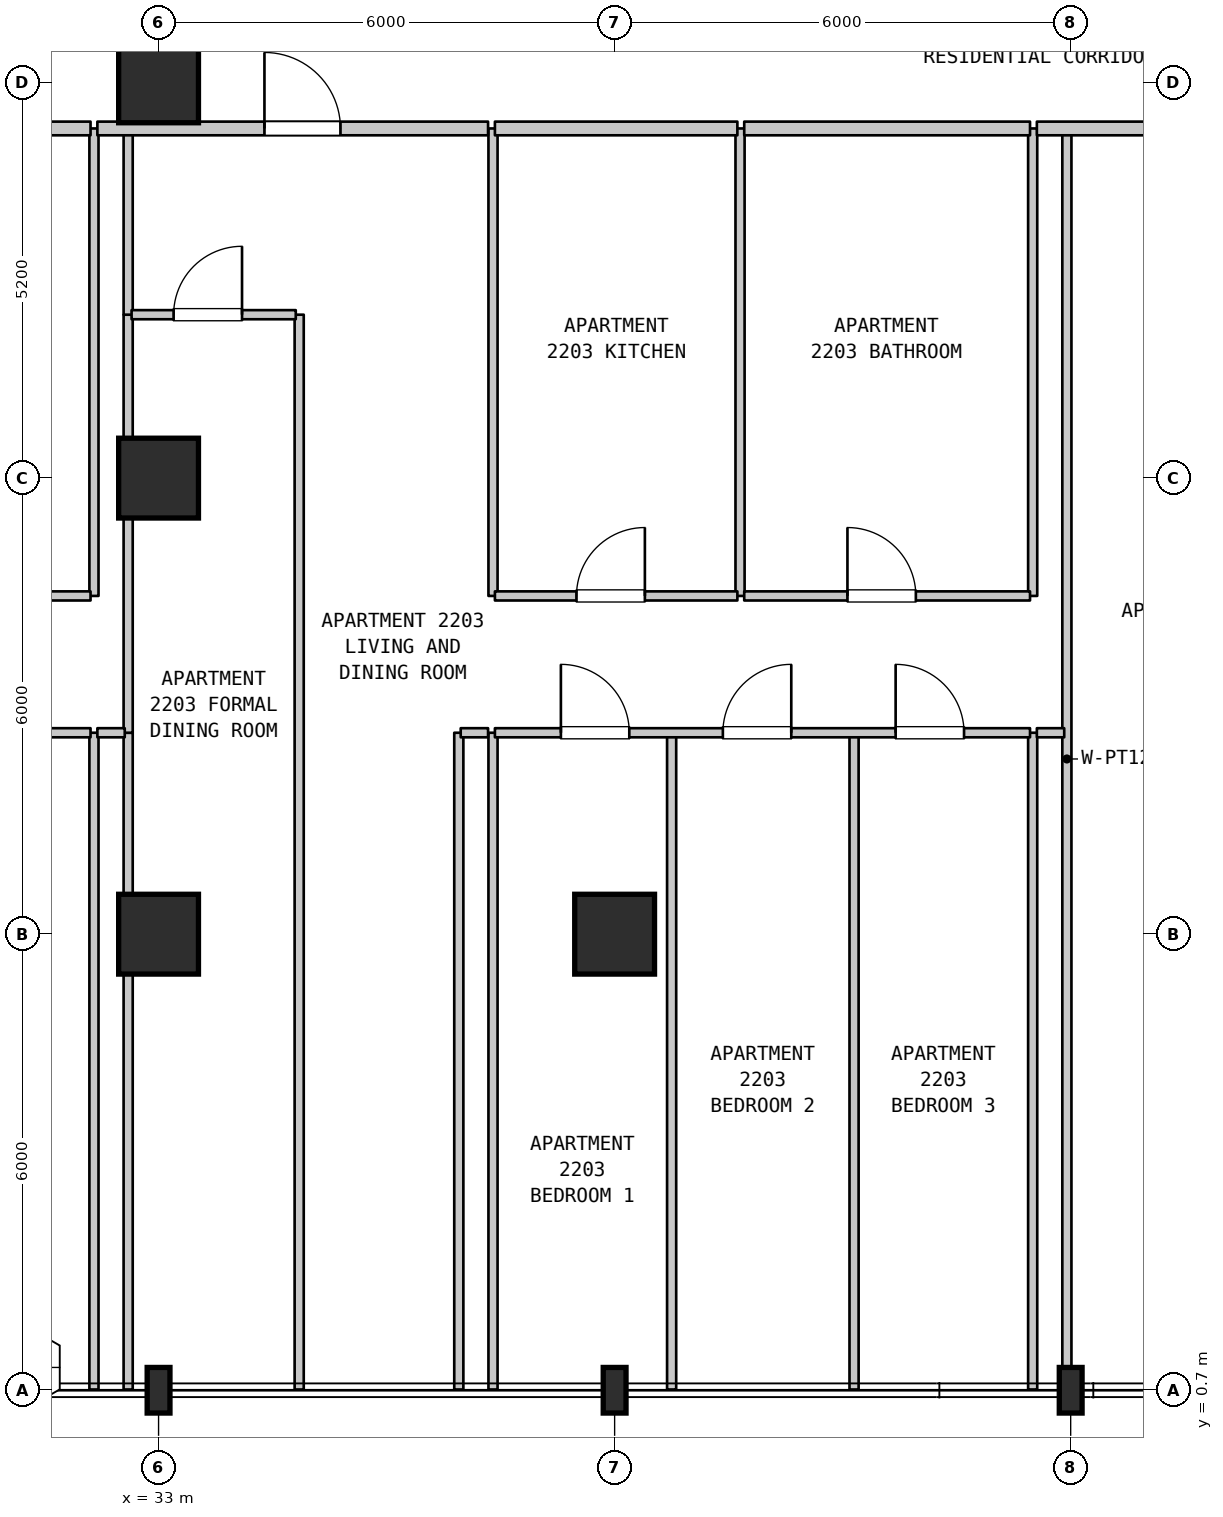
"""IFC4 building model, lengths in metres.
Left out: names, types, materials, properties, quantities, classifications, styles, units other than length and angle.
Written with IfcOpenShell. Run it as: python <this file> out.ifc"""

import sys

from ifc_helpers import new_model, si_unit, direction, frame, frame_2d, origin, origin_2d, place, context, subcontext, project, spatial, rectangle, i_section, extrude, element, fill, save


model = new_model("IFC4")
c1 = context("Model", 3, precision=1e-05, world=origin(), true_north=direction((0.0, 1.0)))
c2 = subcontext(c1, "Body", "Model", "MODEL_VIEW")
j1 = project(units=[si_unit("LENGTHUNIT", "METRE"), si_unit("PLANEANGLEUNIT", "RADIAN")], contexts=[c1])
p1 = place(None, origin())
s1 = spatial("IfcSite", under=j1, at=p1, CompositionType="ELEMENT")
p2 = place(p1, origin())
s2 = spatial("IfcBuilding", under=s1, at=p2, CompositionType="ELEMENT")
p3 = place(p2, frame((0.0, 0.0, 94.6)))
s3 = spatial("IfcBuildingStorey", under=s2, at=p3, CompositionType="ELEMENT", Elevation=94.6)
p4 = place(p3, frame((33.0, 0.7, 0.0), z_axis=(0.0, 0.0, 1.0), x_axis=(1.0, 0.0, 0.0)))
e1 = element("IfcColumn", 1, at=p4, inside=s3, PredefinedType="COLUMN", context=c2, shape_type="SweptSolid", body=[
    extrude(i_section(OverallWidth=0.3, OverallDepth=0.6, WebThickness=0.015, FlangeThickness=0.03, FilletRadius=0.027, at=origin_2d()), origin(), (0.0, 0.0, 1.0), 3.7),
])
for number, where, z_axis, x_axis in (
    (2, (33.0, 6.7, 0.0), (0.0, 0.0, 1.0), (1.0, 0.0, 0.0)),
    (3, (33.0, 12.7, 0.0), (0.0, 0.0, 1.0), (1.0, 0.0, 0.0)),
    (4, (33.0, 17.9, 0.0), (0.0, 0.0, 1.0), (1.0, 0.0, 0.0)),
):
    element("IfcColumn", number, at=place(p3, frame(where, z_axis=z_axis, x_axis=x_axis)), inside=s3, PredefinedType="COLUMN", context=c2, shape_type="SweptSolid", body=[
        extrude(rectangle(XDim=1.05, YDim=1.05, at=origin_2d()), origin(), (0.0, 0.0, 1.0), 3.7),
    ])
p5 = place(p3, frame((39.0, 0.7, 0.0), z_axis=(0.0, 0.0, 1.0), x_axis=(1.0, 0.0, 0.0)))
e5 = element("IfcColumn", 5, at=p5, inside=s3, PredefinedType="COLUMN", context=c2, shape_type="SweptSolid", body=[
    extrude(i_section(OverallWidth=0.3, OverallDepth=0.6, WebThickness=0.015, FlangeThickness=0.03, FilletRadius=0.027, at=origin_2d()), origin(), (0.0, 0.0, 1.0), 3.7),
])
p6 = place(p3, frame((39.0, 6.7, 0.0), z_axis=(0.0, 0.0, 1.0), x_axis=(1.0, 0.0, 0.0)))
e6 = element("IfcColumn", 6, at=p6, inside=s3, PredefinedType="COLUMN", context=c2, shape_type="SweptSolid", body=[
    extrude(rectangle(XDim=1.05, YDim=1.05, at=origin_2d()), origin(), (0.0, 0.0, 1.0), 3.7),
])
p7 = place(p3, frame((45.0, 0.7, 0.0), z_axis=(0.0, 0.0, 1.0), x_axis=(1.0, 0.0, 0.0)))
e7 = element("IfcColumn", 7, at=p7, inside=s3, PredefinedType="COLUMN", context=c2, shape_type="SweptSolid", body=[
    extrude(i_section(OverallWidth=0.3, OverallDepth=0.6, WebThickness=0.015, FlangeThickness=0.03, FilletRadius=0.027, at=origin_2d()), origin(), (0.0, 0.0, 1.0), 3.7),
])
p8 = place(p3, frame((32.15, 0.71, 0.0), z_axis=(0.0, 0.0, 1.0), x_axis=(0.0, 1.0, 0.0)))
e8 = element("IfcWall", 8, at=p8, inside=s3, PredefinedType="PARTITIONING", context=c2, shape_type="SweptSolid", body=[
    extrude(rectangle(XDim=8.64, YDim=0.12, at=frame_2d((4.32, 0.0))), origin(), (0.0, 0.0, 1.0), 3.385),
])
p9 = place(p3, frame((32.15, 11.15, 0.0), z_axis=(0.0, 0.0, 1.0), x_axis=(0.0, 1.0, 0.0)))
e9 = element("IfcWall", 9, at=p9, inside=s3, PredefinedType="PARTITIONING", context=c2, shape_type="SweptSolid", body=[
    extrude(rectangle(XDim=6.15, YDim=0.12, at=frame_2d((3.075, 0.0))), origin(), (0.0, 0.0, 1.0), 3.385),
])
p10 = place(p3, frame((32.6, 0.71, 0.0), z_axis=(0.0, 0.0, 1.0), x_axis=(0.0, 1.0, 0.0)))
e10 = element("IfcWall", 10, at=p10, inside=s3, PredefinedType="PARTITIONING", context=c2, shape_type="SweptSolid", body=[
    extrude(rectangle(XDim=8.64, YDim=0.12, at=frame_2d((4.32, 0.0))), origin(), (0.0, 0.0, 1.0), 3.385),
])
p11 = place(p3, frame((32.6, 9.35, 0.0), z_axis=(0.0, 0.0, 1.0), x_axis=(0.0, 1.0, 0.0)))
e11 = element("IfcWall", 11, at=p11, inside=s3, PredefinedType="PARTITIONING", context=c2, shape_type="SweptSolid", body=[
    extrude(rectangle(XDim=5.5, YDim=0.12, at=frame_2d((2.75, 0.0))), origin(), (0.0, 0.0, 1.0), 3.385),
])
p12 = place(p3, frame((32.6, 14.85, 0.0), z_axis=(0.0, 0.0, 1.0), x_axis=(0.0, 1.0, 0.0)))
e12 = element("IfcWall", 12, at=p12, inside=s3, PredefinedType="PARTITIONING", context=c2, shape_type="SweptSolid", body=[
    extrude(rectangle(XDim=2.45, YDim=0.12, at=frame_2d((1.225, 0.0))), origin(), (0.0, 0.0, 1.0), 3.385),
])
p13 = place(p3, frame((34.85, 0.71, 0.0), z_axis=(0.0, 0.0, 1.0), x_axis=(0.0, 1.0, 0.0)))
e13 = element("IfcWall", 13, at=p13, inside=s3, PredefinedType="PARTITIONING", context=c2, shape_type="SweptSolid", body=[
    extrude(rectangle(XDim=14.14, YDim=0.12, at=frame_2d((7.07, 0.0))), origin(), (0.0, 0.0, 1.0), 3.385),
])
for number, where, z_axis, x_axis in (
    (14, (36.95, 0.71, 0.0), (0.0, 0.0, 1.0), (0.0, 1.0, 0.0)),
    (15, (37.4, 0.71, 0.0), (0.0, 0.0, 1.0), (0.0, 1.0, 0.0)),
):
    element("IfcWall", number, at=place(p3, frame(where, z_axis=z_axis, x_axis=x_axis)), inside=s3, PredefinedType="PARTITIONING", context=c2, shape_type="SweptSolid", body=[
        extrude(rectangle(XDim=8.64, YDim=0.12, at=frame_2d((4.32, 0.0))), origin(), (0.0, 0.0, 1.0), 3.385),
    ])
p14 = place(p3, frame((37.4, 11.15, 0.0), z_axis=(0.0, 0.0, 1.0), x_axis=(0.0, 1.0, 0.0)))
e16 = element("IfcWall", 16, at=p14, inside=s3, PredefinedType="PARTITIONING", context=c2, shape_type="SweptSolid", body=[
    extrude(rectangle(XDim=6.15, YDim=0.12, at=frame_2d((3.075, 0.0))), origin(), (0.0, 0.0, 1.0), 3.385),
])
p15 = place(p3, frame((39.75, 0.71, 0.0), z_axis=(0.0, 0.0, 1.0), x_axis=(0.0, 1.0, 0.0)))
e17 = element("IfcWall", 17, at=p15, inside=s3, PredefinedType="PARTITIONING", context=c2, shape_type="SweptSolid", body=[
    extrude(rectangle(XDim=8.64, YDim=0.12, at=frame_2d((4.32, 0.0))), origin(), (0.0, 0.0, 1.0), 3.385),
])
p16 = place(p3, frame((40.65, 11.15, 0.0), z_axis=(0.0, 0.0, 1.0), x_axis=(0.0, 1.0, 0.0)))
e18 = element("IfcWall", 18, at=p16, inside=s3, PredefinedType="PARTITIONING", context=c2, shape_type="SweptSolid", body=[
    extrude(rectangle(XDim=6.15, YDim=0.12, at=frame_2d((3.075, 0.0))), origin(), (0.0, 0.0, 1.0), 3.385),
])
for number, where, z_axis, x_axis in (
    (19, (42.15, 0.71, 0.0), (0.0, 0.0, 1.0), (0.0, 1.0, 0.0)),
    (20, (44.5, 0.71, 0.0), (0.0, 0.0, 1.0), (0.0, 1.0, 0.0)),
):
    element("IfcWall", number, at=place(p3, frame(where, z_axis=z_axis, x_axis=x_axis)), inside=s3, PredefinedType="PARTITIONING", context=c2, shape_type="SweptSolid", body=[
        extrude(rectangle(XDim=8.64, YDim=0.12, at=frame_2d((4.32, 0.0))), origin(), (0.0, 0.0, 1.0), 3.385),
    ])
p17 = place(p3, frame((44.5, 11.15, 0.0), z_axis=(0.0, 0.0, 1.0), x_axis=(0.0, 1.0, 0.0)))
e21 = element("IfcWall", 21, at=p17, inside=s3, PredefinedType="PARTITIONING", context=c2, shape_type="SweptSolid", body=[
    extrude(rectangle(XDim=6.15, YDim=0.12, at=frame_2d((3.075, 0.0))), origin(), (0.0, 0.0, 1.0), 3.385),
])
p18 = place(p3, frame((44.95, 0.71, 0.0), z_axis=(0.0, 0.0, 1.0), x_axis=(0.0, 1.0, 0.0)))
e22 = element("IfcWall", 22, at=p18, inside=s3, PredefinedType="PARTITIONING", context=c2, shape_type="SweptSolid", body=[
    extrude(rectangle(XDim=16.59, YDim=0.12, at=frame_2d((8.295, 0.0))), origin(), (0.0, 0.0, 1.0), 3.385),
])
p19 = place(p3, frame((25.375, 9.35, 0.0), z_axis=(0.0, 0.0, 1.0), x_axis=(1.0, 0.0, 0.0)))
e23 = element("IfcWall", 23, at=p19, inside=s3, PredefinedType="PARTITIONING", context=c2, shape_type="SweptSolid", body=[
    extrude(rectangle(XDim=6.73, YDim=0.12, at=frame_2d((3.365, 0.0))), origin(), (0.0, 0.0, 1.0), 3.385),
])
p20 = place(p19, frame((1.31, 0.0, 0.0)))
e24 = element("IfcOpeningElement", 24, at=p20, cuts=e23, PredefinedType="OPENING", context=c2, shape_type="SweptSolid", body=[
    extrude(rectangle(XDim=0.9, YDim=2.15, at=frame_2d((0.45, 1.075))), frame((0.0, 0.07, 0.0), z_axis=(0.0, -1.0, 0.0), x_axis=(1.0, 0.0, 0.0)), (0.0, 0.0, 1.0), 0.14),
])
p21 = place(p19, frame((4.37, 0.0, 0.0)))
e25 = element("IfcOpeningElement", 25, at=p21, cuts=e23, PredefinedType="OPENING", context=c2, shape_type="SweptSolid", body=[
    extrude(rectangle(XDim=0.9, YDim=2.15, at=frame_2d((0.45, 1.075))), frame((0.0, 0.07, 0.0), z_axis=(0.0, -1.0, 0.0), x_axis=(1.0, 0.0, 0.0)), (0.0, 0.0, 1.0), 0.14),
])
for number, where, z_axis, x_axis in (
    (26, (32.195, 9.35, 0.0), (0.0, 0.0, 1.0), (1.0, 0.0, 0.0)),
    (27, (36.975, 9.35, 0.0), (0.0, 0.0, 1.0), (1.0, 0.0, 0.0)),
):
    element("IfcWall", number, at=place(p3, frame(where, z_axis=z_axis, x_axis=x_axis)), inside=s3, PredefinedType="PARTITIONING", context=c2, shape_type="SweptSolid", body=[
        extrude(rectangle(XDim=0.36, YDim=0.12, at=frame_2d((0.18, 0.0))), origin(), (0.0, 0.0, 1.0), 3.385),
    ])
p22 = place(p3, frame((37.425, 9.35, 0.0), z_axis=(0.0, 0.0, 1.0), x_axis=(1.0, 0.0, 0.0)))
e28 = element("IfcWall", 28, at=p22, inside=s3, PredefinedType="PARTITIONING", context=c2, shape_type="SweptSolid", body=[
    extrude(rectangle(XDim=7.04, YDim=0.12, at=frame_2d((3.52, 0.0))), origin(), (0.0, 0.0, 1.0), 3.385),
])
p23 = place(p22, frame((0.868, 0.0, 0.0)))
e29 = element("IfcOpeningElement", 29, at=p23, cuts=e28, PredefinedType="OPENING", context=c2, shape_type="SweptSolid", body=[
    extrude(rectangle(XDim=0.9, YDim=2.15, at=frame_2d((0.45, 1.075))), frame((0.0, 0.07, 0.0), z_axis=(0.0, -1.0, 0.0), x_axis=(1.0, 0.0, 0.0)), (0.0, 0.0, 1.0), 0.14),
])
p24 = place(p22, frame((2.999, 0.0, 0.0)))
e30 = element("IfcOpeningElement", 30, at=p24, cuts=e28, PredefinedType="OPENING", context=c2, shape_type="SweptSolid", body=[
    extrude(rectangle(XDim=0.9, YDim=2.15, at=frame_2d((0.45, 1.075))), frame((0.0, 0.07, 0.0), z_axis=(0.0, -1.0, 0.0), x_axis=(1.0, 0.0, 0.0)), (0.0, 0.0, 1.0), 0.14),
])
p25 = place(p22, frame((5.272, 0.0, 0.0)))
e31 = element("IfcOpeningElement", 31, at=p25, cuts=e28, PredefinedType="OPENING", context=c2, shape_type="SweptSolid", body=[
    extrude(rectangle(XDim=0.9, YDim=2.15, at=frame_2d((0.45, 1.075))), frame((0.0, 0.07, 0.0), z_axis=(0.0, -1.0, 0.0), x_axis=(1.0, 0.0, 0.0)), (0.0, 0.0, 1.0), 0.14),
])
p26 = place(p3, frame((44.555, 9.35, 0.0), z_axis=(0.0, 0.0, 1.0), x_axis=(1.0, 0.0, 0.0)))
e32 = element("IfcWall", 32, at=p26, inside=s3, PredefinedType="PARTITIONING", context=c2, shape_type="SweptSolid", body=[
    extrude(rectangle(XDim=0.36, YDim=0.12, at=frame_2d((0.18, 0.0))), origin(), (0.0, 0.0, 1.0), 3.385),
])
p27 = place(p3, frame((28.512, 11.15, 0.0), z_axis=(0.0, 0.0, 1.0), x_axis=(1.0, 0.0, 0.0)))
e33 = element("IfcWall", 33, at=p27, inside=s3, PredefinedType="PARTITIONING", context=c2, shape_type="SweptSolid", body=[
    extrude(rectangle(XDim=3.593, YDim=0.12, at=frame_2d((1.796, 0.0))), origin(), (0.0, 0.0, 1.0), 3.385),
])
p28 = place(p27, frame((1.346, 0.0, 0.0)))
e34 = element("IfcOpeningElement", 34, at=p28, cuts=e33, PredefinedType="OPENING", context=c2, shape_type="SweptSolid", body=[
    extrude(rectangle(XDim=0.9, YDim=2.1, at=frame_2d((0.45, 1.05))), frame((0.0, 0.07, 0.0), z_axis=(0.0, -1.0, 0.0), x_axis=(1.0, 0.0, 0.0)), (0.0, 0.0, 1.0), 0.14),
])
p29 = place(p3, frame((37.425, 11.15, 0.0), z_axis=(0.0, 0.0, 1.0), x_axis=(1.0, 0.0, 0.0)))
e35 = element("IfcWall", 35, at=p29, inside=s3, PredefinedType="PARTITIONING", context=c2, shape_type="SweptSolid", body=[
    extrude(rectangle(XDim=3.19, YDim=0.12, at=frame_2d((1.595, 0.0))), origin(), (0.0, 0.0, 1.0), 3.385),
])
p30 = place(p29, frame((1.073, 0.0, 0.0)))
e36 = element("IfcOpeningElement", 36, at=p30, cuts=e35, PredefinedType="OPENING", context=c2, shape_type="SweptSolid", body=[
    extrude(rectangle(XDim=0.9, YDim=2.15, at=frame_2d((0.45, 1.075))), frame((0.0, 0.07, 0.0), z_axis=(0.0, -1.0, 0.0), x_axis=(1.0, 0.0, 0.0)), (0.0, 0.0, 1.0), 0.14),
])
p31 = place(p3, frame((40.705, 11.15, 0.0), z_axis=(0.0, 0.0, 1.0), x_axis=(1.0, 0.0, 0.0)))
e37 = element("IfcWall", 37, at=p31, inside=s3, PredefinedType="PARTITIONING", context=c2, shape_type="SweptSolid", body=[
    extrude(rectangle(XDim=3.76, YDim=0.12, at=frame_2d((1.88, 0.0))), origin(), (0.0, 0.0, 1.0), 3.385),
])
p32 = place(p31, frame((1.358, 0.0, 0.0)))
e38 = element("IfcOpeningElement", 38, at=p32, cuts=e37, PredefinedType="OPENING", context=c2, shape_type="SweptSolid", body=[
    extrude(rectangle(XDim=0.9, YDim=2.1, at=frame_2d((0.45, 1.05))), frame((0.0, 0.07, 0.0), z_axis=(0.0, -1.0, 0.0), x_axis=(1.0, 0.0, 0.0)), (0.0, 0.0, 1.0), 0.14),
])
p33 = place(p3, frame((32.645, 14.85, 0.0), z_axis=(0.0, 0.0, 1.0), x_axis=(1.0, 0.0, 0.0)))
e39 = element("IfcWall", 39, at=p33, inside=s3, PredefinedType="PARTITIONING", context=c2, shape_type="SweptSolid", body=[
    extrude(rectangle(XDim=2.16, YDim=0.12, at=frame_2d((1.08, 0.0))), origin(), (0.0, 0.0, 1.0), 3.385),
])
p34 = place(p33, frame((0.553, 0.0, 0.0)))
e40 = element("IfcOpeningElement", 40, at=p34, cuts=e39, PredefinedType="OPENING", context=c2, shape_type="SweptSolid", body=[
    extrude(rectangle(XDim=0.9, YDim=2.15, at=frame_2d((0.45, 1.075))), frame((0.0, 0.07, 0.0), z_axis=(0.0, -1.0, 0.0), x_axis=(1.0, 0.0, 0.0)), (0.0, 0.0, 1.0), 0.14),
])
p35 = place(p3, frame((28.512, 17.3, 0.0), z_axis=(0.0, 0.0, 1.0), x_axis=(1.0, 0.0, 0.0)))
e41 = element("IfcWall", 41, at=p35, inside=s3, PredefinedType="STANDARD", context=c2, shape_type="SweptSolid", body=[
    extrude(rectangle(XDim=3.593, YDim=0.18, at=frame_2d((1.796, 0.0))), origin(), (0.0, 0.0, 1.0), 3.385),
])
p36 = place(p3, frame((32.195, 17.3, 0.0), z_axis=(0.0, 0.0, 1.0), x_axis=(1.0, 0.0, 0.0)))
e42 = element("IfcWall", 42, at=p36, inside=s3, PredefinedType="STANDARD", context=c2, shape_type="SweptSolid", body=[
    extrude(rectangle(XDim=5.14, YDim=0.18, at=frame_2d((2.57, 0.0))), origin(), (0.0, 0.0, 1.0), 3.385),
])
p37 = place(p36, frame((2.198, 0.0, 0.0)))
e43 = element("IfcOpeningElement", 43, at=p37, cuts=e42, PredefinedType="OPENING", context=c2, shape_type="SweptSolid", body=[
    extrude(rectangle(XDim=1.0, YDim=2.15, at=frame_2d((0.5, 1.075))), frame((0.0, 0.1, 0.0), z_axis=(0.0, -1.0, 0.0), x_axis=(1.0, 0.0, 0.0)), (0.0, 0.0, 1.0), 0.2),
])
p38 = place(p3, frame((37.425, 17.3, 0.0), z_axis=(0.0, 0.0, 1.0), x_axis=(1.0, 0.0, 0.0)))
e44 = element("IfcWall", 44, at=p38, inside=s3, PredefinedType="STANDARD", context=c2, shape_type="SweptSolid", body=[
    extrude(rectangle(XDim=3.19, YDim=0.18, at=frame_2d((1.595, 0.0))), origin(), (0.0, 0.0, 1.0), 3.385),
])
p39 = place(p3, frame((40.705, 17.3, 0.0), z_axis=(0.0, 0.0, 1.0), x_axis=(1.0, 0.0, 0.0)))
e45 = element("IfcWall", 45, at=p39, inside=s3, PredefinedType="STANDARD", context=c2, shape_type="SweptSolid", body=[
    extrude(rectangle(XDim=3.76, YDim=0.18, at=frame_2d((1.88, 0.0))), origin(), (0.0, 0.0, 1.0), 3.385),
])
p40 = place(p3, frame((44.555, 17.3, 0.0), z_axis=(0.0, 0.0, 1.0), x_axis=(1.0, 0.0, 0.0)))
e46 = element("IfcWall", 46, at=p40, inside=s3, PredefinedType="STANDARD", context=c2, shape_type="SweptSolid", body=[
    extrude(rectangle(XDim=4.97, YDim=0.18, at=frame_2d((2.485, 0.0))), origin(), (0.0, 0.0, 1.0), 3.385),
])
p41 = place(p40, frame((2.185, 0.0, 0.0)))
e47 = element("IfcOpeningElement", 47, at=p41, cuts=e46, PredefinedType="OPENING", context=c2, shape_type="SweptSolid", body=[
    extrude(rectangle(XDim=1.0, YDim=2.15, at=frame_2d((0.5, 1.075))), frame((0.0, 0.1, 0.0), z_axis=(0.0, -1.0, 0.0), x_axis=(1.0, 0.0, 0.0)), (0.0, 0.0, 1.0), 0.2),
])
p42 = place(p23, origin())
e48 = element("IfcDoor", 48, at=p42, inside=s3, OperationType="SINGLE_SWING_LEFT", PredefinedType="DOOR", context=c2, shape_type="SweptSolid", body=[
    extrude(rectangle(XDim=0.9, YDim=2.15, at=frame_2d((0.45, 1.075))), frame((0.0, 0.025, 0.0), z_axis=(0.0, -1.0, 0.0), x_axis=(1.0, 0.0, 0.0)), (0.0, 0.0, 1.0), 0.05),
])
fill(e29, e48)
p43 = place(p24, origin())
e49 = element("IfcDoor", 49, at=p43, inside=s3, OperationType="SINGLE_SWING_RIGHT", PredefinedType="DOOR", context=c2, shape_type="SweptSolid", body=[
    extrude(rectangle(XDim=0.9, YDim=2.15, at=frame_2d((0.45, 1.075))), frame((0.0, 0.025, 0.0), z_axis=(0.0, -1.0, 0.0), x_axis=(1.0, 0.0, 0.0)), (0.0, 0.0, 1.0), 0.05),
])
fill(e30, e49)
p44 = place(p25, origin())
e50 = element("IfcDoor", 50, at=p44, inside=s3, OperationType="SINGLE_SWING_LEFT", PredefinedType="DOOR", context=c2, shape_type="SweptSolid", body=[
    extrude(rectangle(XDim=0.9, YDim=2.15, at=frame_2d((0.45, 1.075))), frame((0.0, 0.025, 0.0), z_axis=(0.0, -1.0, 0.0), x_axis=(1.0, 0.0, 0.0)), (0.0, 0.0, 1.0), 0.05),
])
fill(e31, e50)
p45 = place(p30, origin())
e51 = element("IfcDoor", 51, at=p45, inside=s3, OperationType="SINGLE_SWING_RIGHT", PredefinedType="DOOR", context=c2, shape_type="SweptSolid", body=[
    extrude(rectangle(XDim=0.9, YDim=2.15, at=frame_2d((0.45, 1.075))), frame((0.0, 0.025, 0.0), z_axis=(0.0, -1.0, 0.0), x_axis=(1.0, 0.0, 0.0)), (0.0, 0.0, 1.0), 0.05),
])
fill(e36, e51)
p46 = place(p32, origin())
e52 = element("IfcDoor", 52, at=p46, inside=s3, OperationType="SINGLE_SWING_LEFT", PredefinedType="DOOR", context=c2, shape_type="SweptSolid", body=[
    extrude(rectangle(XDim=0.9, YDim=2.1, at=frame_2d((0.45, 1.05))), frame((0.0, 0.025, 0.0), z_axis=(0.0, -1.0, 0.0), x_axis=(1.0, 0.0, 0.0)), (0.0, 0.0, 1.0), 0.05),
])
fill(e38, e52)
p47 = place(p34, origin())
e53 = element("IfcDoor", 53, at=p47, inside=s3, OperationType="SINGLE_SWING_RIGHT", PredefinedType="DOOR", context=c2, shape_type="SweptSolid", body=[
    extrude(rectangle(XDim=0.9, YDim=2.15, at=frame_2d((0.45, 1.075))), frame((0.0, 0.025, 0.0), z_axis=(0.0, -1.0, 0.0), x_axis=(1.0, 0.0, 0.0)), (0.0, 0.0, 1.0), 0.05),
])
fill(e40, e53)
p48 = place(p37, origin())
e54 = element("IfcDoor", 54, at=p48, inside=s3, OperationType="SINGLE_SWING_LEFT", PredefinedType="DOOR", context=c2, shape_type="SweptSolid", body=[
    extrude(rectangle(XDim=1.0, YDim=2.15, at=frame_2d((0.5, 1.075))), frame((0.0, 0.025, 0.0), z_axis=(0.0, -1.0, 0.0), x_axis=(1.0, 0.0, 0.0)), (0.0, 0.0, 1.0), 0.05),
])
fill(e43, e54)
save(model, sys.argv[1])
